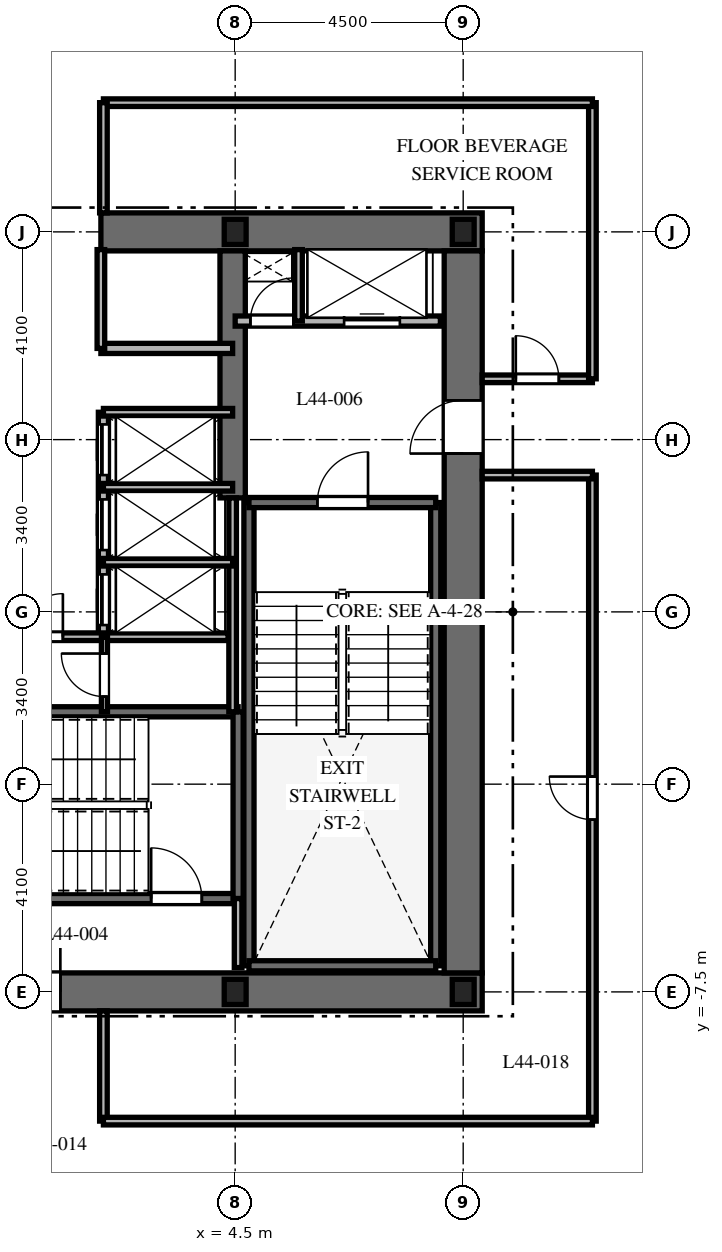
"""IFC4 building model, lengths in metres.
Left out: names, types, materials, properties, quantities, classifications, styles, units other than length and angle.
Written with IfcOpenShell. Run it as: python <this file> out.ifc"""

import sys

from ifc_helpers import new_model, si_unit, direction, frame, frame_2d, origin, origin_2d, place, context, subcontext, project, spatial, rectangle, i_section, extrude, element, fill, save


model = new_model("IFC4")
c1 = context("Model", 3, precision=1e-05, world=origin(), true_north=direction((0.0, 1.0)))
c2 = subcontext(c1, "Body", "Model", "MODEL_VIEW")
j1 = project(units=[si_unit("LENGTHUNIT", "METRE"), si_unit("PLANEANGLEUNIT", "RADIAN")], contexts=[c1])
p1 = place(None, origin())
s1 = spatial("IfcSite", under=j1, at=p1, CompositionType="ELEMENT")
p2 = place(p1, origin())
s2 = spatial("IfcBuilding", under=s1, at=p2, CompositionType="ELEMENT")
p3 = place(p2, frame((0.0, 0.0, 179.3)))
s3 = spatial("IfcBuildingStorey", under=s2, at=p3, CompositionType="ELEMENT", Elevation=179.3)
p4 = place(p3, frame((-9.375, -7.5, 0.0), z_axis=(0.0, 0.0, 1.0), x_axis=(1.0, 0.0, 0.0)))
e1 = element("IfcWall", 1, at=p4, inside=s3, PredefinedType="SHEAR", context=c2, shape_type="SweptSolid", body=[
    extrude(rectangle(XDim=18.75, YDim=0.75, at=frame_2d((9.375, 0.0))), origin(), (0.0, 0.0, 1.0), 3.7),
])
p5 = place(p4, frame((9.425, 0.0, 0.0)))
e2 = element("IfcOpeningElement", 2, at=p5, cuts=e1, PredefinedType="OPENING", context=c2, shape_type="SweptSolid", body=[
    extrude(rectangle(XDim=1.0, YDim=2.15, at=frame_2d((0.5, 1.075))), frame((0.0, 0.385, 0.0), z_axis=(0.0, -1.0, 0.0), x_axis=(1.0, 0.0, 0.0)), (0.0, 0.0, 1.0), 0.77),
])
p6 = place(p3, frame((1.85, 7.5, 0.0), z_axis=(0.0, 0.0, 1.0), x_axis=(1.0, 0.0, 0.0)))
e3 = element("IfcWall", 3, at=p6, inside=s3, PredefinedType="SHEAR", context=c2, shape_type="SweptSolid", body=[
    extrude(rectangle(XDim=7.525, YDim=0.75, at=frame_2d((3.762, 0.0))), origin(), (0.0, 0.0, 1.0), 3.7),
])
p7 = place(p3, frame((9.0, -7.125, 0.0), z_axis=(0.0, 0.0, 1.0), x_axis=(0.0, 1.0, 0.0)))
e4 = element("IfcWall", 4, at=p7, inside=s3, PredefinedType="SHEAR", context=c2, shape_type="SweptSolid", body=[
    extrude(rectangle(XDim=14.25, YDim=0.75, at=frame_2d((7.125, 0.0))), origin(), (0.0, 0.0, 1.0), 3.7),
])
p8 = place(p7, frame((10.25, 0.0, 0.0)))
e5 = element("IfcOpeningElement", 5, at=p8, cuts=e4, PredefinedType="OPENING", context=c2, shape_type="SweptSolid", body=[
    extrude(rectangle(XDim=1.05, YDim=2.15, at=frame_2d((0.525, 1.075))), frame((0.0, 0.385, 0.0), z_axis=(0.0, -1.0, 0.0), x_axis=(1.0, 0.0, 0.0)), (0.0, 0.0, 1.0), 0.77),
])
p9 = place(p3, frame((4.45, 2.25, 0.0), z_axis=(0.0, 0.0, 1.0), x_axis=(0.0, 1.0, 0.0)))
e6 = element("IfcWall", 6, at=p9, inside=s3, PredefinedType="SHEAR", context=c2, shape_type="SweptSolid", body=[
    extrude(rectangle(XDim=4.875, YDim=0.5, at=frame_2d((2.438, 0.0))), origin(), (0.0, 0.0, 1.0), 3.7),
])
for number, where, z_axis, x_axis in (
    (7, (4.772, -6.985, 0.0), (0.0, 0.0, 1.0), (0.0, 1.0, 0.0)),
    (8, (8.458, -6.985, 0.0), (0.0, 0.0, 1.0), (0.0, 1.0, 0.0)),
):
    element("IfcWall", number, at=place(p3, frame(where, z_axis=z_axis, x_axis=x_axis)), inside=s3, PredefinedType="SHEAR", context=c2, shape_type="SweptSolid", body=[
        extrude(rectangle(XDim=9.143, YDim=0.2, at=frame_2d((4.572, 0.0))), origin(), (0.0, 0.0, 1.0), 3.7),
    ])
p10 = place(p3, frame((4.772, -6.985, 0.0), z_axis=(0.0, 0.0, 1.0), x_axis=(1.0, 0.0, 0.0)))
e9 = element("IfcWall", 9, at=p10, inside=s3, PredefinedType="SHEAR", context=c2, shape_type="SweptSolid", body=[
    extrude(rectangle(XDim=3.686, YDim=0.2, at=frame_2d((1.843, 0.0))), origin(), (0.0, 0.0, 1.0), 3.7),
])
p11 = place(p3, frame((4.772, 2.158, 0.0), z_axis=(0.0, 0.0, 1.0), x_axis=(1.0, 0.0, 0.0)))
e10 = element("IfcWall", 10, at=p11, inside=s3, PredefinedType="SHEAR", context=c2, shape_type="SweptSolid", body=[
    extrude(rectangle(XDim=3.686, YDim=0.2, at=frame_2d((1.843, 0.0))), origin(), (0.0, 0.0, 1.0), 3.7),
])
p12 = place(p11, frame((1.35, 0.0, 0.0)))
e11 = element("IfcOpeningElement", 11, at=p12, cuts=e10, PredefinedType="OPENING", context=c2, shape_type="SweptSolid", body=[
    extrude(rectangle(XDim=1.0, YDim=2.15, at=frame_2d((0.5, 1.075))), frame((0.0, 0.11, 0.0), z_axis=(0.0, -1.0, 0.0), x_axis=(1.0, 0.0, 0.0)), (0.0, 0.0, 1.0), 0.22),
])
p13 = place(p3, frame((-4.608, -5.658, 0.0), z_axis=(0.0, 0.0, 1.0), x_axis=(1.0, 0.0, 0.0)))
e12 = element("IfcWall", 12, at=p13, inside=s3, PredefinedType="SHEAR", context=c2, shape_type="SweptSolid", body=[
    extrude(rectangle(XDim=9.166, YDim=0.2, at=frame_2d((4.583, 0.0))), origin(), (0.0, 0.0, 1.0), 3.7),
])
p14 = place(p13, frame((7.45, 0.0, 0.0)))
e13 = element("IfcOpeningElement", 13, at=p14, cuts=e12, PredefinedType="OPENING", context=c2, shape_type="SweptSolid", body=[
    extrude(rectangle(XDim=1.0, YDim=2.15, at=frame_2d((0.5, 1.075))), frame((0.0, 0.11, 0.0), z_axis=(0.0, -1.0, 0.0), x_axis=(1.0, 0.0, 0.0)), (0.0, 0.0, 1.0), 0.22),
])
p15 = place(p3, frame((-4.608, -1.972, 0.0), z_axis=(0.0, 0.0, 1.0), x_axis=(1.0, 0.0, 0.0)))
e14 = element("IfcWall", 14, at=p15, inside=s3, PredefinedType="SHEAR", context=c2, shape_type="SweptSolid", body=[
    extrude(rectangle(XDim=9.166, YDim=0.2, at=frame_2d((4.583, 0.0))), origin(), (0.0, 0.0, 1.0), 3.7),
])
p16 = place(p3, frame((4.558, -5.658, 0.0), z_axis=(0.0, 0.0, 1.0), x_axis=(0.0, 1.0, 0.0)))
e15 = element("IfcWall", 15, at=p16, inside=s3, PredefinedType="SHEAR", context=c2, shape_type="SweptSolid", body=[
    extrude(rectangle(XDim=3.686, YDim=0.2, at=frame_2d((1.843, 0.0))), origin(), (0.0, 0.0, 1.0), 3.7),
])
for number, where, z_axis, x_axis in (
    (16, (4.5, -7.5, 0.0), (0.0, 0.0, 1.0), (1.0, 0.0, 0.0)),
    (17, (9.0, -7.5, 0.0), (0.0, 0.0, 1.0), (1.0, 0.0, 0.0)),
    (18, (9.0, 7.5, 0.0), (0.0, 0.0, 1.0), (1.0, 0.0, 0.0)),
    (19, (4.5, 7.5, 0.0), (0.0, 0.0, 1.0), (1.0, 0.0, 0.0)),
):
    element("IfcColumn", number, at=place(p3, frame(where, z_axis=z_axis, x_axis=x_axis)), inside=s3, PredefinedType="COLUMN", context=c2, shape_type="SweptSolid", body=[
        extrude(i_section(OverallWidth=0.432, OverallDepth=0.498, WebThickness=0.056, FlangeThickness=0.089, at=origin_2d()), origin(), (0.0, 0.0, 1.0), 3.7),
    ])
p17 = place(p3, frame((4.558, -7.02, 0.0), z_axis=(0.0, 0.0, 1.0), x_axis=(0.0, 1.0, 0.0)))
e20 = element("IfcWall", 20, at=p17, inside=s3, PredefinedType="PARTITIONING", context=c2, shape_type="SweptSolid", body=[
    extrude(rectangle(XDim=1.362, YDim=0.15, at=frame_2d((0.681, 0.0))), origin(), (0.0, 0.0, 1.0), 3.4),
])
p18 = place(p3, frame((4.5, 5.74, 0.0), z_axis=(0.0, 0.0, 1.0), x_axis=(1.0, 0.0, 0.0)))
e21 = element("IfcWall", 21, at=p18, inside=s3, PredefinedType="PARTITIONING", context=c2, shape_type="SweptSolid", body=[
    extrude(rectangle(XDim=4.05, YDim=0.2, at=frame_2d((2.025, 0.0))), origin(), (0.0, 0.0, 1.0), 3.4),
])
p19 = place(p18, frame((0.3, 0.0, 0.0)))
e22 = element("IfcOpeningElement", 22, at=p19, cuts=e21, PredefinedType="OPENING", context=c2, shape_type="SweptSolid", body=[
    extrude(rectangle(XDim=0.85, YDim=2.03, at=frame_2d((0.425, 1.015))), frame((0.0, 0.11, 0.0), z_axis=(0.0, -1.0, 0.0), x_axis=(1.0, 0.0, 0.0)), (0.0, 0.0, 1.0), 0.22),
])
p20 = place(p18, frame((2.15, 0.0, 0.0)))
e23 = element("IfcOpeningElement", 23, at=p20, cuts=e21, PredefinedType="OPENING", context=c2, shape_type="SweptSolid", body=[
    extrude(rectangle(XDim=1.1, YDim=2.2, at=frame_2d((0.55, 1.1))), frame((0.0, 0.11, 0.0), z_axis=(0.0, -1.0, 0.0), x_axis=(1.0, 0.0, 0.0)), (0.0, 0.0, 1.0), 0.22),
])
p21 = place(p3, frame((5.75, 5.74, 0.0), z_axis=(0.0, 0.0, 1.0), x_axis=(0.0, 1.0, 0.0)))
e24 = element("IfcWall", 24, at=p21, inside=s3, PredefinedType="PARTITIONING", context=c2, shape_type="SweptSolid", body=[
    extrude(rectangle(XDim=1.41, YDim=0.15, at=frame_2d((0.705, 0.0))), origin(), (0.0, 0.0, 1.0), 3.4),
])
p22 = place(p3, frame((1.85, 5.2, 0.0), z_axis=(0.0, 0.0, 1.0), x_axis=(1.0, 0.0, 0.0)))
e25 = element("IfcWall", 25, at=p22, inside=s3, PredefinedType="PARTITIONING", context=c2, shape_type="SweptSolid", body=[
    extrude(rectangle(XDim=2.6, YDim=0.2, at=frame_2d((1.3, 0.0))), origin(), (0.0, 0.0, 1.0), 3.4),
])
p23 = place(p3, frame((1.85, 5.2, 0.0), z_axis=(0.0, 0.0, 1.0), x_axis=(0.0, 1.0, 0.0)))
e26 = element("IfcWall", 26, at=p23, inside=s3, PredefinedType="PARTITIONING", context=c2, shape_type="SweptSolid", body=[
    extrude(rectangle(XDim=1.95, YDim=0.15, at=frame_2d((0.975, 0.0))), origin(), (0.0, 0.0, 1.0), 3.4),
])
p24 = place(p3, frame((4.45, -1.972, 0.0), z_axis=(0.0, 0.0, 1.0), x_axis=(0.0, 1.0, 0.0)))
e27 = element("IfcWall", 27, at=p24, inside=s3, PredefinedType="PARTITIONING", context=c2, shape_type="SweptSolid", body=[
    extrude(rectangle(XDim=4.222, YDim=0.15, at=frame_2d((2.111, 0.0))), origin(), (0.0, 0.0, 1.0), 3.4),
])
p25 = place(p3, frame((1.9, -0.5, 0.0), z_axis=(0.0, 0.0, 1.0), x_axis=(0.0, 1.0, 0.0)))
e28 = element("IfcWall", 28, at=p25, inside=s3, PredefinedType="PARTITIONING", context=c2, shape_type="SweptSolid", body=[
    extrude(rectangle(XDim=4.44, YDim=0.2, at=frame_2d((2.22, 0.0))), origin(), (0.0, 0.0, 1.0), 3.4),
])
p26 = place(p25, frame((0.24, 0.0, 0.0)))
e29 = element("IfcOpeningElement", 29, at=p26, cuts=e28, PredefinedType="OPENING", context=c2, shape_type="SweptSolid", body=[
    extrude(rectangle(XDim=1.0, YDim=2.2, at=frame_2d((0.5, 1.1))), frame((0.0, 0.11, 0.0), z_axis=(0.0, -1.0, 0.0), x_axis=(1.0, 0.0, 0.0)), (0.0, 0.0, 1.0), 0.22),
])
p27 = place(p25, frame((1.72, 0.0, 0.0)))
e30 = element("IfcOpeningElement", 30, at=p27, cuts=e28, PredefinedType="OPENING", context=c2, shape_type="SweptSolid", body=[
    extrude(rectangle(XDim=1.0, YDim=2.2, at=frame_2d((0.5, 1.1))), frame((0.0, 0.11, 0.0), z_axis=(0.0, -1.0, 0.0), x_axis=(1.0, 0.0, 0.0)), (0.0, 0.0, 1.0), 0.22),
])
p28 = place(p25, frame((3.2, 0.0, 0.0)))
e31 = element("IfcOpeningElement", 31, at=p28, cuts=e28, PredefinedType="OPENING", context=c2, shape_type="SweptSolid", body=[
    extrude(rectangle(XDim=1.0, YDim=2.2, at=frame_2d((0.5, 1.1))), frame((0.0, 0.11, 0.0), z_axis=(0.0, -1.0, 0.0), x_axis=(1.0, 0.0, 0.0)), (0.0, 0.0, 1.0), 0.22),
])
for number, where, z_axis, x_axis in (
    (32, (1.9, 3.94, 0.0), (0.0, 0.0, 1.0), (1.0, 0.0, 0.0)),
    (33, (1.9, 0.98, 0.0), (0.0, 0.0, 1.0), (1.0, 0.0, 0.0)),
    (34, (1.9, 2.46, 0.0), (0.0, 0.0, 1.0), (1.0, 0.0, 0.0)),
):
    element("IfcWall", number, at=place(p3, frame(where, z_axis=z_axis, x_axis=x_axis)), inside=s3, PredefinedType="PARTITIONING", context=c2, shape_type="SweptSolid", body=[
        extrude(rectangle(XDim=2.55, YDim=0.15, at=frame_2d((1.275, 0.0))), origin(), (0.0, 0.0, 1.0), 3.4),
    ])
p29 = place(p3, frame((-4.36, -0.49, 0.0), z_axis=(0.0, 0.0, 1.0), x_axis=(1.0, 0.0, 0.0)))
e35 = element("IfcWall", 35, at=p29, inside=s3, PredefinedType="PARTITIONING", context=c2, shape_type="SweptSolid", body=[
    extrude(rectangle(XDim=8.72, YDim=0.15, at=frame_2d((4.36, 0.0))), origin(), (0.0, 0.0, 1.0), 3.4),
])
p30 = place(p29, frame((2.81, 0.0, 0.0)))
e36 = element("IfcOpeningElement", 36, at=p30, cuts=e35, PredefinedType="OPENING", context=c2, shape_type="SweptSolid", body=[
    extrude(rectangle(XDim=0.85, YDim=2.03, at=frame_2d((0.425, 1.015))), frame((0.0, 0.085, 0.0), z_axis=(0.0, -1.0, 0.0), x_axis=(1.0, 0.0, 0.0)), (0.0, 0.0, 1.0), 0.17),
])
p31 = place(p29, frame((4.61, 0.0, 0.0)))
e37 = element("IfcOpeningElement", 37, at=p31, cuts=e35, PredefinedType="OPENING", context=c2, shape_type="SweptSolid", body=[
    extrude(rectangle(XDim=0.85, YDim=2.03, at=frame_2d((0.425, 1.015))), frame((0.0, 0.085, 0.0), z_axis=(0.0, -1.0, 0.0), x_axis=(1.0, 0.0, 0.0)), (0.0, 0.0, 1.0), 0.17),
])
p32 = place(p3, frame((1.92, -1.972, 0.0), z_axis=(0.0, 0.0, 1.0), x_axis=(0.0, 1.0, 0.0)))
e38 = element("IfcWall", 38, at=p32, inside=s3, PredefinedType="PARTITIONING", context=c2, shape_type="SweptSolid", body=[
    extrude(rectangle(XDim=1.472, YDim=0.12, at=frame_2d((0.736, 0.0))), origin(), (0.0, 0.0, 1.0), 3.4),
])
p33 = place(p32, frame((0.3, 0.0, 0.0)))
e39 = element("IfcOpeningElement", 39, at=p33, cuts=e38, PredefinedType="OPENING", context=c2, shape_type="SweptSolid", body=[
    extrude(rectangle(XDim=0.85, YDim=2.03, at=frame_2d((0.425, 1.015))), frame((0.0, 0.07, 0.0), z_axis=(0.0, -1.0, 0.0), x_axis=(1.0, 0.0, 0.0)), (0.0, 0.0, 1.0), 0.14),
])
p34 = place(p3, frame((11.55, -10.05, 0.0), z_axis=(0.0, 0.0, 1.0), x_axis=(0.0, 1.0, 0.0)))
e40 = element("IfcWall", 40, at=p34, inside=s3, PredefinedType="PARTITIONING", context=c2, shape_type="SweptSolid", body=[
    extrude(rectangle(XDim=12.75, YDim=0.15, at=frame_2d((6.375, 0.0))), origin(), (0.0, 0.0, 1.0), 2.84),
])
p35 = place(p34, frame((5.95, 0.0, 0.0)))
e41 = element("IfcOpeningElement", 41, at=p35, cuts=e40, PredefinedType="OPENING", context=c2, shape_type="SweptSolid", body=[
    extrude(rectangle(XDim=0.85, YDim=2.03, at=frame_2d((0.425, 1.015))), frame((0.0, 0.085, 0.0), z_axis=(0.0, -1.0, 0.0), x_axis=(1.0, 0.0, 0.0)), (0.0, 0.0, 1.0), 0.17),
])
p36 = place(p3, frame((11.55, 2.7, 0.0), z_axis=(0.0, 0.0, 1.0), x_axis=(-1.0, 0.0, 0.0)))
e42 = element("IfcWall", 42, at=p36, inside=s3, PredefinedType="PARTITIONING", context=c2, shape_type="SweptSolid", body=[
    extrude(rectangle(XDim=2.175, YDim=0.15, at=frame_2d((1.087, 0.0))), origin(), (0.0, 0.0, 1.0), 3.4),
])
p37 = place(p3, frame((9.375, 4.6, 0.0), z_axis=(0.0, 0.0, 1.0), x_axis=(1.0, 0.0, 0.0)))
e43 = element("IfcWall", 43, at=p37, inside=s3, PredefinedType="PARTITIONING", context=c2, shape_type="SweptSolid", body=[
    extrude(rectangle(XDim=2.175, YDim=0.15, at=frame_2d((1.087, 0.0))), origin(), (0.0, 0.0, 1.0), 3.4),
])
p38 = place(p37, frame((0.663, 0.0, 0.0)))
e44 = element("IfcOpeningElement", 44, at=p38, cuts=e43, PredefinedType="OPENING", context=c2, shape_type="SweptSolid", body=[
    extrude(rectangle(XDim=0.85, YDim=2.03, at=frame_2d((0.425, 1.015))), frame((0.0, 0.085, 0.0), z_axis=(0.0, -1.0, 0.0), x_axis=(1.0, 0.0, 0.0)), (0.0, 0.0, 1.0), 0.17),
])
p39 = place(p3, frame((11.55, 4.6, 0.0), z_axis=(0.0, 0.0, 1.0), x_axis=(0.0, 1.0, 0.0)))
e45 = element("IfcWall", 45, at=p39, inside=s3, PredefinedType="PARTITIONING", context=c2, shape_type="SweptSolid", body=[
    extrude(rectangle(XDim=5.45, YDim=0.15, at=frame_2d((2.725, 0.0))), origin(), (0.0, 0.0, 1.0), 2.84),
])
p40 = place(p3, frame((11.55, 10.05, 0.0), z_axis=(0.0, 0.0, 1.0), x_axis=(-1.0, 0.0, 0.0)))
e46 = element("IfcWall", 46, at=p40, inside=s3, PredefinedType="PARTITIONING", context=c2, shape_type="SweptSolid", body=[
    extrude(rectangle(XDim=9.65, YDim=0.15, at=frame_2d((4.825, 0.0))), origin(), (0.0, 0.0, 1.0), 2.84),
])
for number, where, z_axis, x_axis in (
    (47, (1.9, 10.05, 0.0), (0.0, 0.0, 1.0), (0.0, -1.0, 0.0)),
    (48, (1.9, -7.875, 0.0), (0.0, 0.0, 1.0), (0.0, -1.0, 0.0)),
):
    element("IfcWall", number, at=place(p3, frame(where, z_axis=z_axis, x_axis=x_axis)), inside=s3, PredefinedType="PARTITIONING", context=c2, shape_type="SweptSolid", body=[
        extrude(rectangle(XDim=2.175, YDim=0.15, at=frame_2d((1.087, 0.0))), origin(), (0.0, 0.0, 1.0), 3.4),
    ])
p41 = place(p3, frame((1.9, -10.05, 0.0), z_axis=(0.0, 0.0, 1.0), x_axis=(1.0, 0.0, 0.0)))
e49 = element("IfcWall", 49, at=p41, inside=s3, PredefinedType="PARTITIONING", context=c2, shape_type="SweptSolid", body=[
    extrude(rectangle(XDim=9.65, YDim=0.15, at=frame_2d((4.825, 0.0))), origin(), (0.0, 0.0, 1.0), 2.84),
])
p42 = place(p12, origin())
e50 = element("IfcDoor", 50, at=p42, inside=s3, OperationType="SINGLE_SWING_RIGHT", PredefinedType="DOOR", context=c2, shape_type="SweptSolid", body=[
    extrude(rectangle(XDim=1.0, YDim=2.15, at=frame_2d((0.5, 1.075))), frame((0.0, 0.025, 0.0), z_axis=(0.0, -1.0, 0.0), x_axis=(1.0, 0.0, 0.0)), (0.0, 0.0, 1.0), 0.05),
])
fill(e11, e50)
p43 = place(p14, origin())
e51 = element("IfcDoor", 51, at=p43, inside=s3, OperationType="SINGLE_SWING_LEFT", PredefinedType="DOOR", context=c2, shape_type="SweptSolid", body=[
    extrude(rectangle(XDim=1.0, YDim=2.15, at=frame_2d((0.5, 1.075))), frame((0.0, 0.025, 0.0), z_axis=(0.0, -1.0, 0.0), x_axis=(1.0, 0.0, 0.0)), (0.0, 0.0, 1.0), 0.05),
])
fill(e13, e51)
p44 = place(p5, origin())
e52 = element("IfcDoor", 52, at=p44, inside=s3, OperationType="SINGLE_SWING_RIGHT", PredefinedType="DOOR", context=c2, shape_type="SweptSolid", body=[
    extrude(rectangle(XDim=1.0, YDim=2.15, at=frame_2d((0.5, 1.075))), frame((0.0, 0.025, 0.0), z_axis=(0.0, -1.0, 0.0), x_axis=(1.0, 0.0, 0.0)), (0.0, 0.0, 1.0), 0.05),
])
fill(e2, e52)
p45 = place(p8, origin())
e53 = element("IfcDoor", 53, at=p45, inside=s3, OperationType="SINGLE_SWING_LEFT", PredefinedType="DOOR", context=c2, shape_type="SweptSolid", body=[
    extrude(rectangle(XDim=1.05, YDim=2.15, at=frame_2d((0.525, 1.075))), frame((0.0, 0.025, 0.0), z_axis=(0.0, -1.0, 0.0), x_axis=(1.0, 0.0, 0.0)), (0.0, 0.0, 1.0), 0.05),
])
fill(e5, e53)
p46 = place(p19, origin())
e54 = element("IfcDoor", 54, at=p46, inside=s3, OperationType="SINGLE_SWING_RIGHT", PredefinedType="DOOR", context=c2, shape_type="SweptSolid", body=[
    extrude(rectangle(XDim=0.85, YDim=2.03, at=frame_2d((0.425, 1.015))), frame((0.0, 0.025, 0.0), z_axis=(0.0, -1.0, 0.0), x_axis=(1.0, 0.0, 0.0)), (0.0, 0.0, 1.0), 0.05),
])
fill(e22, e54)
p47 = place(p20, origin())
e55 = element("IfcDoor", 55, at=p47, inside=s3, OperationType="SLIDING_TO_RIGHT", PredefinedType="DOOR", context=c2, shape_type="SweptSolid", body=[
    extrude(rectangle(XDim=1.1, YDim=2.2, at=frame_2d((0.55, 1.1))), frame((0.0, 0.025, 0.0), z_axis=(0.0, -1.0, 0.0), x_axis=(1.0, 0.0, 0.0)), (0.0, 0.0, 1.0), 0.05),
])
fill(e23, e55)
p48 = place(p26, origin())
e56 = element("IfcDoor", 56, at=p48, inside=s3, OperationType="SLIDING_TO_RIGHT", PredefinedType="DOOR", context=c2, shape_type="SweptSolid", body=[
    extrude(rectangle(XDim=1.0, YDim=2.2, at=frame_2d((0.5, 1.1))), frame((0.0, 0.025, 0.0), z_axis=(0.0, -1.0, 0.0), x_axis=(1.0, 0.0, 0.0)), (0.0, 0.0, 1.0), 0.05),
])
fill(e29, e56)
p49 = place(p27, origin())
e57 = element("IfcDoor", 57, at=p49, inside=s3, OperationType="SLIDING_TO_RIGHT", PredefinedType="DOOR", context=c2, shape_type="SweptSolid", body=[
    extrude(rectangle(XDim=1.0, YDim=2.2, at=frame_2d((0.5, 1.1))), frame((0.0, 0.025, 0.0), z_axis=(0.0, -1.0, 0.0), x_axis=(1.0, 0.0, 0.0)), (0.0, 0.0, 1.0), 0.05),
])
fill(e30, e57)
p50 = place(p28, origin())
e58 = element("IfcDoor", 58, at=p50, inside=s3, OperationType="SLIDING_TO_RIGHT", PredefinedType="DOOR", context=c2, shape_type="SweptSolid", body=[
    extrude(rectangle(XDim=1.0, YDim=2.2, at=frame_2d((0.5, 1.1))), frame((0.0, 0.025, 0.0), z_axis=(0.0, -1.0, 0.0), x_axis=(1.0, 0.0, 0.0)), (0.0, 0.0, 1.0), 0.05),
])
fill(e31, e58)
p51 = place(p31, origin())
e59 = element("IfcDoor", 59, at=p51, inside=s3, OperationType="SINGLE_SWING_RIGHT", PredefinedType="DOOR", context=c2, shape_type="SweptSolid", body=[
    extrude(rectangle(XDim=0.85, YDim=2.03, at=frame_2d((0.425, 1.015))), frame((0.0, 0.025, 0.0), z_axis=(0.0, -1.0, 0.0), x_axis=(1.0, 0.0, 0.0)), (0.0, 0.0, 1.0), 0.05),
])
fill(e37, e59)
p52 = place(p33, origin())
e60 = element("IfcDoor", 60, at=p52, inside=s3, OperationType="SINGLE_SWING_RIGHT", PredefinedType="DOOR", context=c2, shape_type="SweptSolid", body=[
    extrude(rectangle(XDim=0.85, YDim=2.03, at=frame_2d((0.425, 1.015))), frame((0.0, 0.025, 0.0), z_axis=(0.0, -1.0, 0.0), x_axis=(1.0, 0.0, 0.0)), (0.0, 0.0, 1.0), 0.05),
])
fill(e39, e60)
p53 = place(p38, origin())
e61 = element("IfcDoor", 61, at=p53, inside=s3, OperationType="SINGLE_SWING_LEFT", PredefinedType="DOOR", context=c2, shape_type="SweptSolid", body=[
    extrude(rectangle(XDim=0.85, YDim=2.03, at=frame_2d((0.425, 1.015))), frame((0.0, 0.025, 0.0), z_axis=(0.0, -1.0, 0.0), x_axis=(1.0, 0.0, 0.0)), (0.0, 0.0, 1.0), 0.05),
])
fill(e44, e61)
p54 = place(p35, origin())
e62 = element("IfcDoor", 62, at=p54, inside=s3, OperationType="SINGLE_SWING_RIGHT", PredefinedType="DOOR", context=c2, shape_type="SweptSolid", body=[
    extrude(rectangle(XDim=0.85, YDim=2.03, at=frame_2d((0.425, 1.015))), frame((0.0, 0.025, 0.0), z_axis=(0.0, -1.0, 0.0), x_axis=(1.0, 0.0, 0.0)), (0.0, 0.0, 1.0), 0.05),
])
fill(e41, e62)
save(model, sys.argv[1])
